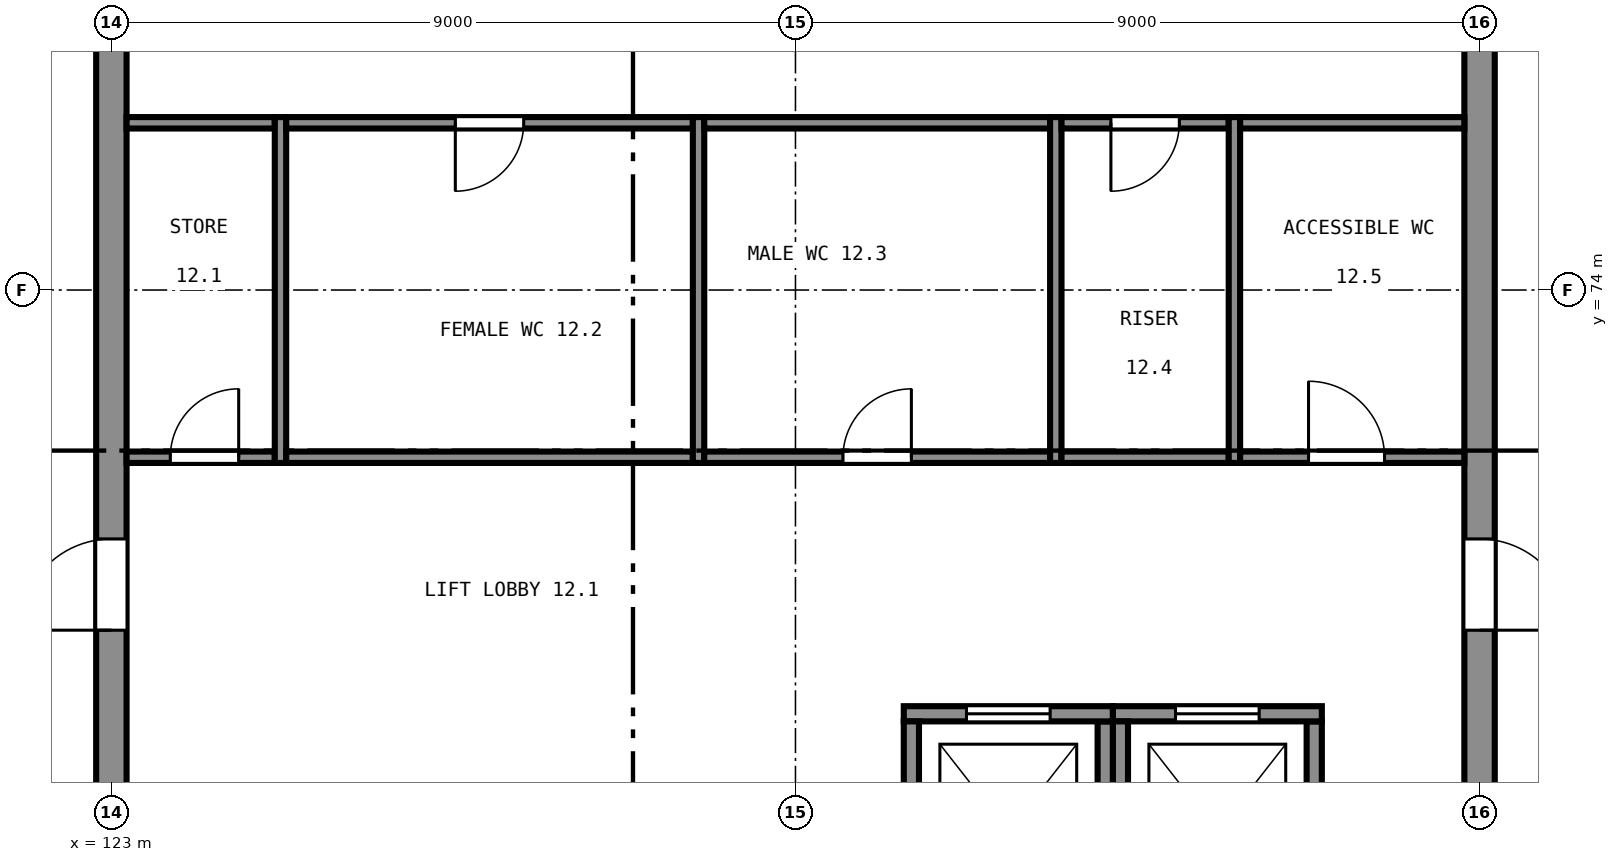
"""IFC4 building model, lengths in metres.
Left out: names, types, materials, properties, quantities, classifications, styles, units other than length and angle.
Written with IfcOpenShell. Run it as: python <this file> out.ifc"""

import sys

from ifc_helpers import new_model, si_unit, direction, frame, frame_2d, origin, place, context, subcontext, project, spatial, rectangle, extrude, element, fill, save


model = new_model("IFC4")
c1 = context("Model", 3, precision=1e-05, world=origin(), true_north=direction((0.0, 1.0)))
c2 = subcontext(c1, "Body", "Model", "MODEL_VIEW")
j1 = project(units=[si_unit("LENGTHUNIT", "METRE"), si_unit("PLANEANGLEUNIT", "RADIAN")], contexts=[c1])
p1 = place(None, origin())
s1 = spatial("IfcSite", under=j1, at=p1, CompositionType="ELEMENT")
p2 = place(p1, origin())
s2 = spatial("IfcBuilding", under=s1, at=p2, CompositionType="ELEMENT")
p3 = place(p2, frame((0.0, 0.0, 49.5)))
s3 = spatial("IfcBuildingStorey", under=s2, at=p3, CompositionType="ELEMENT", Elevation=49.5)
p4 = place(p3, frame((141.0, 65.2, 0.0), z_axis=(0.0, 0.0, 1.0), x_axis=(0.0, 1.0, 0.0)))
e1 = element("IfcWall", 1, at=p4, inside=s3, PredefinedType="SHEAR", context=c2, shape_type="SweptSolid", body=[
    extrude(rectangle(XDim=17.6, YDim=0.4, at=frame_2d((8.8, 0.0))), origin(), (0.0, 0.0, 1.0), 4.0),
])
p5 = place(p4, frame((4.325, 0.0, 0.0)))
e2 = element("IfcOpeningElement", 2, at=p5, cuts=e1, PredefinedType="OPENING", context=c2, shape_type="SweptSolid", body=[
    extrude(rectangle(XDim=1.2, YDim=2.1, at=frame_2d((0.6, 1.05))), frame((0.0, 0.21, 0.0), z_axis=(0.0, -1.0, 0.0), x_axis=(1.0, 0.0, 0.0)), (0.0, 0.0, 1.0), 0.42),
])
p6 = place(p4, frame((12.075, 0.0, 0.0)))
e3 = element("IfcOpeningElement", 3, at=p6, cuts=e1, PredefinedType="OPENING", context=c2, shape_type="SweptSolid", body=[
    extrude(rectangle(XDim=1.2, YDim=2.1, at=frame_2d((0.6, 1.05))), frame((0.0, 0.21, 0.0), z_axis=(0.0, -1.0, 0.0), x_axis=(1.0, 0.0, 0.0)), (0.0, 0.0, 1.0), 0.42),
])
p7 = place(p3, frame((123.0, 82.8, 0.0), z_axis=(0.0, 0.0, 1.0), x_axis=(0.0, -1.0, 0.0)))
e4 = element("IfcWall", 4, at=p7, inside=s3, PredefinedType="SHEAR", context=c2, shape_type="SweptSolid", body=[
    extrude(rectangle(XDim=17.6, YDim=0.4, at=frame_2d((8.8, 0.0))), origin(), (0.0, 0.0, 1.0), 4.0),
])
p8 = place(p7, frame((12.075, 0.0, 0.0)))
e5 = element("IfcOpeningElement", 5, at=p8, cuts=e4, PredefinedType="OPENING", context=c2, shape_type="SweptSolid", body=[
    extrude(rectangle(XDim=1.2, YDim=2.1, at=frame_2d((0.6, 1.05))), frame((0.0, 0.21, 0.0), z_axis=(0.0, -1.0, 0.0), x_axis=(1.0, 0.0, 0.0)), (0.0, 0.0, 1.0), 0.42),
])
p9 = place(p7, frame((4.325, 0.0, 0.0)))
e6 = element("IfcOpeningElement", 6, at=p9, cuts=e4, PredefinedType="OPENING", context=c2, shape_type="SweptSolid", body=[
    extrude(rectangle(XDim=1.2, YDim=2.1, at=frame_2d((0.6, 1.05))), frame((0.0, 0.21, 0.0), z_axis=(0.0, -1.0, 0.0), x_axis=(1.0, 0.0, 0.0)), (0.0, 0.0, 1.0), 0.42),
])
p10 = place(p3, frame((136.075, 65.425, 0.0), z_axis=(0.0, 0.0, 1.0), x_axis=(0.0, 1.0, 0.0)))
e7 = element("IfcWall", 7, at=p10, inside=s3, PredefinedType="SHEAR", context=c2, shape_type="SweptSolid", body=[
    extrude(rectangle(XDim=2.9, YDim=0.2, at=frame_2d((1.45, 0.0))), origin(), (0.0, 0.0, 1.0), 4.0),
])
p11 = place(p3, frame((136.175, 68.425, 0.0), z_axis=(0.0, 0.0, 1.0), x_axis=(-1.0, 0.0, 0.0)))
e8 = element("IfcWall", 8, at=p11, inside=s3, PredefinedType="SHEAR", context=c2, shape_type="SweptSolid", body=[
    extrude(rectangle(XDim=2.75, YDim=0.2, at=frame_2d((1.375, 0.0))), origin(), (0.0, 0.0, 1.0), 4.0),
])
p12 = place(p11, frame((0.825, 0.0, 0.0)))
e9 = element("IfcOpeningElement", 9, at=p12, cuts=e8, PredefinedType="OPENING", context=c2, shape_type="SweptSolid", body=[
    extrude(rectangle(XDim=1.1, YDim=2.1, at=frame_2d((0.55, 1.05))), frame((0.0, 0.11, 0.0), z_axis=(0.0, -1.0, 0.0), x_axis=(1.0, 0.0, 0.0)), (0.0, 0.0, 1.0), 0.22),
])
for number, where, z_axis, x_axis in (
    (10, (133.525, 68.325, 0.0), (0.0, 0.0, 1.0), (0.0, -1.0, 0.0)),
    (11, (138.825, 65.425, 0.0), (0.0, 0.0, 1.0), (0.0, 1.0, 0.0)),
):
    element("IfcWall", number, at=place(p3, frame(where, z_axis=z_axis, x_axis=x_axis)), inside=s3, PredefinedType="SHEAR", context=c2, shape_type="SweptSolid", body=[
        extrude(rectangle(XDim=2.9, YDim=0.2, at=frame_2d((1.45, 0.0))), origin(), (0.0, 0.0, 1.0), 4.0),
    ])
p13 = place(p3, frame((138.925, 68.425, 0.0), z_axis=(0.0, 0.0, 1.0), x_axis=(-1.0, 0.0, 0.0)))
e12 = element("IfcWall", 12, at=p13, inside=s3, PredefinedType="SHEAR", context=c2, shape_type="SweptSolid", body=[
    extrude(rectangle(XDim=2.75, YDim=0.2, at=frame_2d((1.375, 0.0))), origin(), (0.0, 0.0, 1.0), 4.0),
])
p14 = place(p13, frame((0.825, 0.0, 0.0)))
e13 = element("IfcOpeningElement", 13, at=p14, cuts=e12, PredefinedType="OPENING", context=c2, shape_type="SweptSolid", body=[
    extrude(rectangle(XDim=1.1, YDim=2.1, at=frame_2d((0.55, 1.05))), frame((0.0, 0.11, 0.0), z_axis=(0.0, -1.0, 0.0), x_axis=(1.0, 0.0, 0.0)), (0.0, 0.0, 1.0), 0.22),
])
p15 = place(p3, frame((136.275, 68.325, 0.0), z_axis=(0.0, 0.0, 1.0), x_axis=(0.0, -1.0, 0.0)))
e14 = element("IfcWall", 14, at=p15, inside=s3, PredefinedType="SHEAR", context=c2, shape_type="SweptSolid", body=[
    extrude(rectangle(XDim=2.9, YDim=0.2, at=frame_2d((1.45, 0.0))), origin(), (0.0, 0.0, 1.0), 4.0),
])
p16 = place(p3, frame((125.225, 71.725, 0.0), z_axis=(0.0, 0.0, 1.0), x_axis=(0.0, 1.0, 0.0)))
e15 = element("IfcWall", 15, at=p16, inside=s3, PredefinedType="PARTITIONING", context=c2, shape_type="SweptSolid", body=[
    extrude(rectangle(XDim=4.55, YDim=0.15, at=frame_2d((2.275, 0.0))), origin(), (0.0, 0.0, 1.0), 3.58),
])
p17 = place(p3, frame((123.2, 71.8, 0.0), z_axis=(0.0, 0.0, 1.0), x_axis=(1.0, 0.0, 0.0)))
e16 = element("IfcWall", 16, at=p17, inside=s3, PredefinedType="PARTITIONING", context=c2, shape_type="SweptSolid", body=[
    extrude(rectangle(XDim=1.95, YDim=0.15, at=frame_2d((0.975, 0.0))), origin(), (0.0, 0.0, 1.0), 3.58),
])
p18 = place(p17, frame((0.575, 0.0, 0.0)))
e17 = element("IfcOpeningElement", 17, at=p18, cuts=e16, PredefinedType="OPENING", context=c2, shape_type="SweptSolid", body=[
    extrude(rectangle(XDim=0.9, YDim=2.1, at=frame_2d((0.45, 1.05))), frame((0.0, 0.085, 0.0), z_axis=(0.0, -1.0, 0.0), x_axis=(1.0, 0.0, 0.0)), (0.0, 0.0, 1.0), 0.17),
])
p19 = place(p3, frame((123.2, 76.2, 0.0), z_axis=(0.0, 0.0, 1.0), x_axis=(1.0, 0.0, 0.0)))
e18 = element("IfcWall", 18, at=p19, inside=s3, PredefinedType="PARTITIONING", context=c2, shape_type="SweptSolid", body=[
    extrude(rectangle(XDim=1.95, YDim=0.15, at=frame_2d((0.975, 0.0))), origin(), (0.0, 0.0, 1.0), 3.58),
])
p20 = place(p3, frame((130.725, 71.725, 0.0), z_axis=(0.0, 0.0, 1.0), x_axis=(0.0, 1.0, 0.0)))
e19 = element("IfcWall", 19, at=p20, inside=s3, PredefinedType="PARTITIONING", context=c2, shape_type="SweptSolid", body=[
    extrude(rectangle(XDim=4.55, YDim=0.15, at=frame_2d((2.275, 0.0))), origin(), (0.0, 0.0, 1.0), 3.58),
])
p21 = place(p3, frame((125.3, 71.8, 0.0), z_axis=(0.0, 0.0, 1.0), x_axis=(1.0, 0.0, 0.0)))
e20 = element("IfcWall", 20, at=p21, inside=s3, PredefinedType="PARTITIONING", context=c2, shape_type="SweptSolid", body=[
    extrude(rectangle(XDim=5.35, YDim=0.15, at=frame_2d((2.675, 0.0))), origin(), (0.0, 0.0, 1.0), 3.58),
])
p22 = place(p3, frame((125.3, 76.2, 0.0), z_axis=(0.0, 0.0, 1.0), x_axis=(1.0, 0.0, 0.0)))
e21 = element("IfcWall", 21, at=p22, inside=s3, PredefinedType="PARTITIONING", context=c2, shape_type="SweptSolid", body=[
    extrude(rectangle(XDim=5.35, YDim=0.15, at=frame_2d((2.675, 0.0))), origin(), (0.0, 0.0, 1.0), 3.58),
])
p23 = place(p22, frame((2.225, 0.0, 0.0)))
e22 = element("IfcOpeningElement", 22, at=p23, cuts=e21, PredefinedType="OPENING", context=c2, shape_type="SweptSolid", body=[
    extrude(rectangle(XDim=0.9, YDim=2.1, at=frame_2d((0.45, 1.05))), frame((0.0, 0.085, 0.0), z_axis=(0.0, -1.0, 0.0), x_axis=(1.0, 0.0, 0.0)), (0.0, 0.0, 1.0), 0.17),
])
p24 = place(p3, frame((135.425, 71.725, 0.0), z_axis=(0.0, 0.0, 1.0), x_axis=(0.0, 1.0, 0.0)))
e23 = element("IfcWall", 23, at=p24, inside=s3, PredefinedType="PARTITIONING", context=c2, shape_type="SweptSolid", body=[
    extrude(rectangle(XDim=4.55, YDim=0.15, at=frame_2d((2.275, 0.0))), origin(), (0.0, 0.0, 1.0), 3.58),
])
p25 = place(p3, frame((130.8, 71.8, 0.0), z_axis=(0.0, 0.0, 1.0), x_axis=(1.0, 0.0, 0.0)))
e24 = element("IfcWall", 24, at=p25, inside=s3, PredefinedType="PARTITIONING", context=c2, shape_type="SweptSolid", body=[
    extrude(rectangle(XDim=4.55, YDim=0.15, at=frame_2d((2.275, 0.0))), origin(), (0.0, 0.0, 1.0), 3.58),
])
p26 = place(p25, frame((1.825, 0.0, 0.0)))
e25 = element("IfcOpeningElement", 25, at=p26, cuts=e24, PredefinedType="OPENING", context=c2, shape_type="SweptSolid", body=[
    extrude(rectangle(XDim=0.9, YDim=2.1, at=frame_2d((0.45, 1.05))), frame((0.0, 0.085, 0.0), z_axis=(0.0, -1.0, 0.0), x_axis=(1.0, 0.0, 0.0)), (0.0, 0.0, 1.0), 0.17),
])
p27 = place(p3, frame((130.8, 76.2, 0.0), z_axis=(0.0, 0.0, 1.0), x_axis=(1.0, 0.0, 0.0)))
e26 = element("IfcWall", 26, at=p27, inside=s3, PredefinedType="PARTITIONING", context=c2, shape_type="SweptSolid", body=[
    extrude(rectangle(XDim=4.55, YDim=0.15, at=frame_2d((2.275, 0.0))), origin(), (0.0, 0.0, 1.0), 3.58),
])
p28 = place(p3, frame((137.775, 71.725, 0.0), z_axis=(0.0, 0.0, 1.0), x_axis=(0.0, 1.0, 0.0)))
e27 = element("IfcWall", 27, at=p28, inside=s3, PredefinedType="PARTITIONING", context=c2, shape_type="SweptSolid", body=[
    extrude(rectangle(XDim=4.55, YDim=0.15, at=frame_2d((2.275, 0.0))), origin(), (0.0, 0.0, 1.0), 3.58),
])
p29 = place(p3, frame((135.5, 71.8, 0.0), z_axis=(0.0, 0.0, 1.0), x_axis=(1.0, 0.0, 0.0)))
e28 = element("IfcWall", 28, at=p29, inside=s3, PredefinedType="PARTITIONING", context=c2, shape_type="SweptSolid", body=[
    extrude(rectangle(XDim=2.2, YDim=0.15, at=frame_2d((1.1, 0.0))), origin(), (0.0, 0.0, 1.0), 3.58),
])
p30 = place(p3, frame((135.5, 76.2, 0.0), z_axis=(0.0, 0.0, 1.0), x_axis=(1.0, 0.0, 0.0)))
e29 = element("IfcWall", 29, at=p30, inside=s3, PredefinedType="PARTITIONING", context=c2, shape_type="SweptSolid", body=[
    extrude(rectangle(XDim=2.2, YDim=0.15, at=frame_2d((1.1, 0.0))), origin(), (0.0, 0.0, 1.0), 3.58),
])
p31 = place(p30, frame((0.65, 0.0, 0.0)))
e30 = element("IfcOpeningElement", 30, at=p31, cuts=e29, PredefinedType="OPENING", context=c2, shape_type="SweptSolid", body=[
    extrude(rectangle(XDim=0.9, YDim=2.1, at=frame_2d((0.45, 1.05))), frame((0.0, 0.085, 0.0), z_axis=(0.0, -1.0, 0.0), x_axis=(1.0, 0.0, 0.0)), (0.0, 0.0, 1.0), 0.17),
])
p32 = place(p3, frame((137.85, 71.8, 0.0), z_axis=(0.0, 0.0, 1.0), x_axis=(1.0, 0.0, 0.0)))
e31 = element("IfcWall", 31, at=p32, inside=s3, PredefinedType="PARTITIONING", context=c2, shape_type="SweptSolid", body=[
    extrude(rectangle(XDim=2.95, YDim=0.15, at=frame_2d((1.475, 0.0))), origin(), (0.0, 0.0, 1.0), 3.58),
])
p33 = place(p32, frame((0.9, 0.0, 0.0)))
e32 = element("IfcOpeningElement", 32, at=p33, cuts=e31, PredefinedType="OPENING", context=c2, shape_type="SweptSolid", body=[
    extrude(rectangle(XDim=1.0, YDim=2.1, at=frame_2d((0.5, 1.05))), frame((0.0, 0.085, 0.0), z_axis=(0.0, -1.0, 0.0), x_axis=(1.0, 0.0, 0.0)), (0.0, 0.0, 1.0), 0.17),
])
p34 = place(p3, frame((137.85, 76.2, 0.0), z_axis=(0.0, 0.0, 1.0), x_axis=(1.0, 0.0, 0.0)))
e33 = element("IfcWall", 33, at=p34, inside=s3, PredefinedType="PARTITIONING", context=c2, shape_type="SweptSolid", body=[
    extrude(rectangle(XDim=2.95, YDim=0.15, at=frame_2d((1.475, 0.0))), origin(), (0.0, 0.0, 1.0), 3.58),
])
p35 = place(p12, origin())
e34 = element("IfcDoor", 34, at=p35, inside=s3, OperationType="SLIDING_TO_LEFT", PredefinedType="DOOR", context=c2, shape_type="SweptSolid", body=[
    extrude(rectangle(XDim=1.1, YDim=2.1, at=frame_2d((0.55, 1.05))), frame((0.0, 0.025, 0.0), z_axis=(0.0, -1.0, 0.0), x_axis=(1.0, 0.0, 0.0)), (0.0, 0.0, 1.0), 0.05),
])
fill(e9, e34)
p36 = place(p14, origin())
e35 = element("IfcDoor", 35, at=p36, inside=s3, OperationType="SLIDING_TO_LEFT", PredefinedType="DOOR", context=c2, shape_type="SweptSolid", body=[
    extrude(rectangle(XDim=1.1, YDim=2.1, at=frame_2d((0.55, 1.05))), frame((0.0, 0.025, 0.0), z_axis=(0.0, -1.0, 0.0), x_axis=(1.0, 0.0, 0.0)), (0.0, 0.0, 1.0), 0.05),
])
fill(e13, e35)
p37 = place(p8, frame((1.2, 0.0, 0.0), z_axis=(0.0, 0.0, 1.0), x_axis=(-1.0, 0.0, 0.0)))
e36 = element("IfcDoor", 36, at=p37, inside=s3, OperationType="SINGLE_SWING_RIGHT", PredefinedType="DOOR", context=c2, shape_type="SweptSolid", body=[
    extrude(rectangle(XDim=1.2, YDim=2.1, at=frame_2d((0.6, 1.05))), frame((0.0, 0.025, 0.0), z_axis=(0.0, -1.0, 0.0), x_axis=(1.0, 0.0, 0.0)), (0.0, 0.0, 1.0), 0.05),
])
fill(e5, e36)
p38 = place(p5, frame((1.2, 0.0, 0.0), z_axis=(0.0, 0.0, 1.0), x_axis=(-1.0, 0.0, 0.0)))
e37 = element("IfcDoor", 37, at=p38, inside=s3, OperationType="SINGLE_SWING_LEFT", PredefinedType="DOOR", context=c2, shape_type="SweptSolid", body=[
    extrude(rectangle(XDim=1.2, YDim=2.1, at=frame_2d((0.6, 1.05))), frame((0.0, 0.025, 0.0), z_axis=(0.0, -1.0, 0.0), x_axis=(1.0, 0.0, 0.0)), (0.0, 0.0, 1.0), 0.05),
])
fill(e2, e37)
p39 = place(p18, origin())
e38 = element("IfcDoor", 38, at=p39, inside=s3, OperationType="SINGLE_SWING_LEFT", PredefinedType="DOOR", context=c2, shape_type="SweptSolid", body=[
    extrude(rectangle(XDim=0.9, YDim=2.1, at=frame_2d((0.45, 1.05))), frame((0.0, 0.025, 0.0), z_axis=(0.0, -1.0, 0.0), x_axis=(1.0, 0.0, 0.0)), (0.0, 0.0, 1.0), 0.05),
])
fill(e17, e38)
p40 = place(p23, frame((0.9, 0.0, 0.0), z_axis=(0.0, 0.0, 1.0), x_axis=(-1.0, 0.0, 0.0)))
e39 = element("IfcDoor", 39, at=p40, inside=s3, OperationType="SINGLE_SWING_LEFT", PredefinedType="DOOR", context=c2, shape_type="SweptSolid", body=[
    extrude(rectangle(XDim=0.9, YDim=2.1, at=frame_2d((0.45, 1.05))), frame((0.0, 0.025, 0.0), z_axis=(0.0, -1.0, 0.0), x_axis=(1.0, 0.0, 0.0)), (0.0, 0.0, 1.0), 0.05),
])
fill(e22, e39)
p41 = place(p26, origin())
e40 = element("IfcDoor", 40, at=p41, inside=s3, OperationType="SINGLE_SWING_LEFT", PredefinedType="DOOR", context=c2, shape_type="SweptSolid", body=[
    extrude(rectangle(XDim=0.9, YDim=2.1, at=frame_2d((0.45, 1.05))), frame((0.0, 0.025, 0.0), z_axis=(0.0, -1.0, 0.0), x_axis=(1.0, 0.0, 0.0)), (0.0, 0.0, 1.0), 0.05),
])
fill(e25, e40)
p42 = place(p31, frame((0.9, 0.0, 0.0), z_axis=(0.0, 0.0, 1.0), x_axis=(-1.0, 0.0, 0.0)))
e41 = element("IfcDoor", 41, at=p42, inside=s3, OperationType="SINGLE_SWING_LEFT", PredefinedType="DOOR", context=c2, shape_type="SweptSolid", body=[
    extrude(rectangle(XDim=0.9, YDim=2.1, at=frame_2d((0.45, 1.05))), frame((0.0, 0.025, 0.0), z_axis=(0.0, -1.0, 0.0), x_axis=(1.0, 0.0, 0.0)), (0.0, 0.0, 1.0), 0.05),
])
fill(e30, e41)
p43 = place(p33, origin())
e42 = element("IfcDoor", 42, at=p43, inside=s3, OperationType="SINGLE_SWING_RIGHT", PredefinedType="DOOR", context=c2, shape_type="SweptSolid", body=[
    extrude(rectangle(XDim=1.0, YDim=2.1, at=frame_2d((0.5, 1.05))), frame((0.0, 0.025, 0.0), z_axis=(0.0, -1.0, 0.0), x_axis=(1.0, 0.0, 0.0)), (0.0, 0.0, 1.0), 0.05),
])
fill(e32, e42)
save(model, sys.argv[1])
